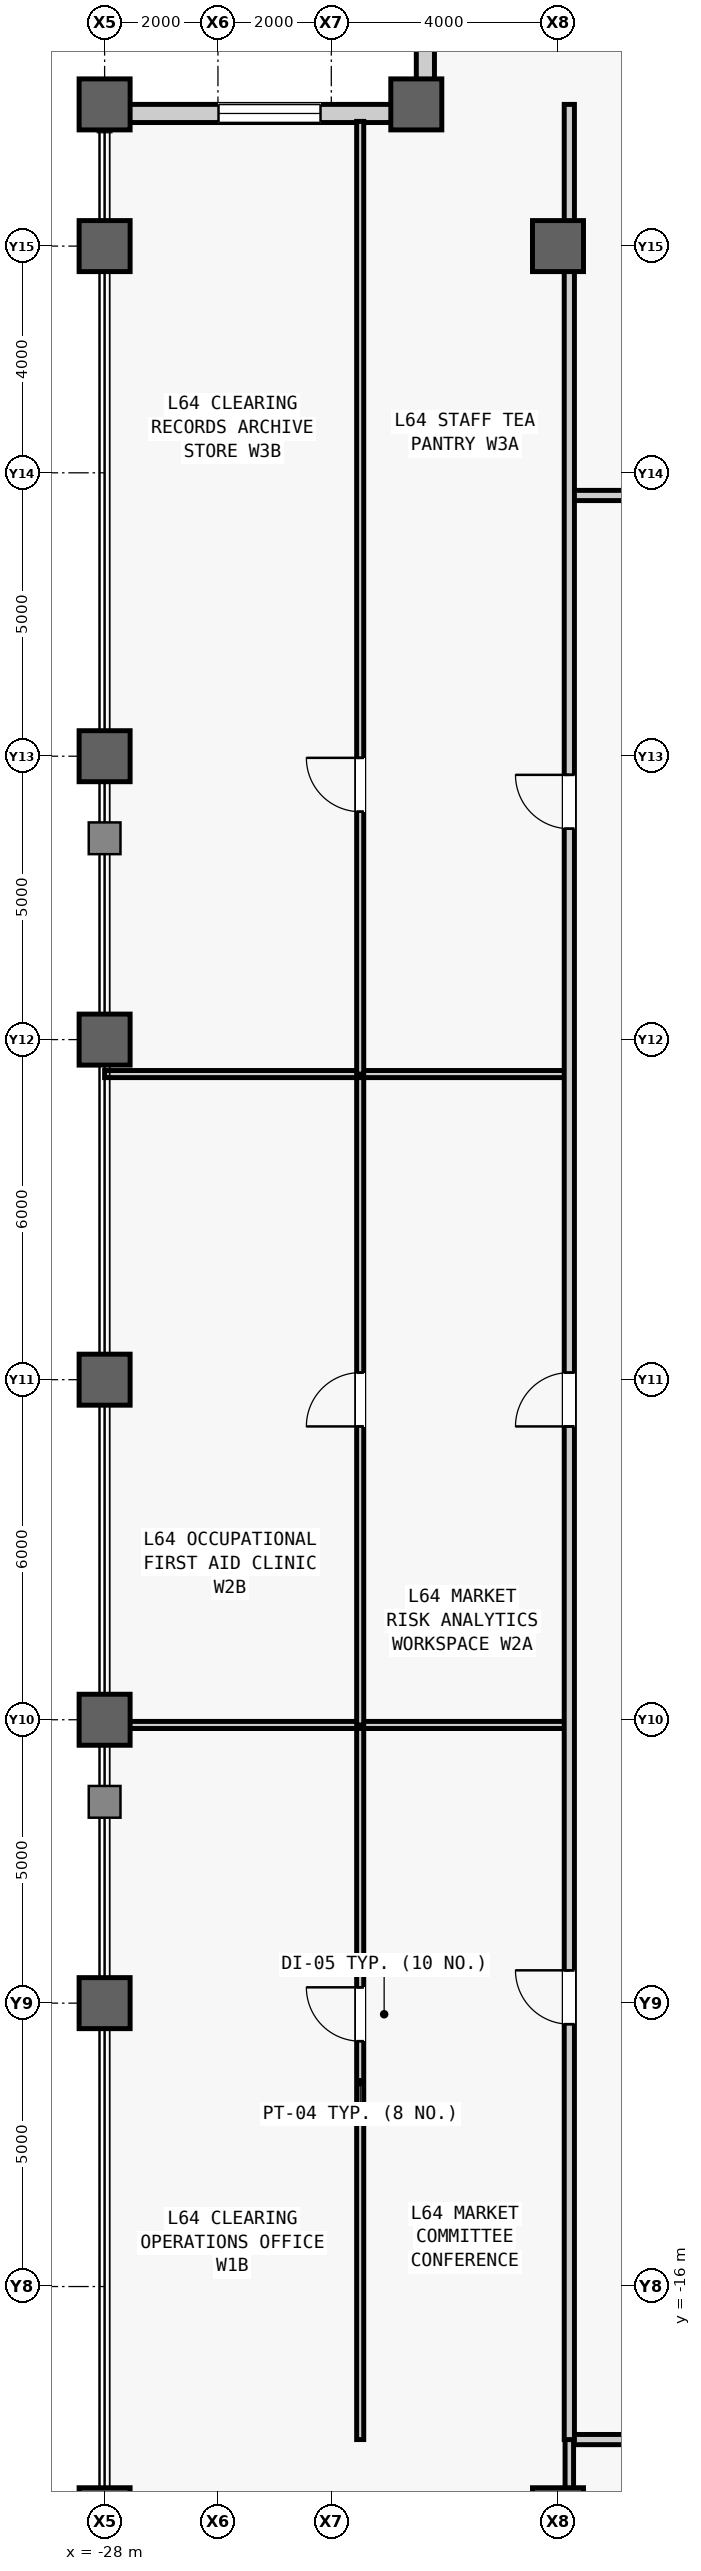
"""IFC4 building model, lengths in metres.
Left out: names, types, materials, properties, quantities, classifications, styles, units other than length and angle.
Written with IfcOpenShell. Run it as: python <this file> out.ifc"""

import sys

from ifc_helpers import new_model, si_unit, direction, frame, frame_2d, origin, origin_2d, place, context, subcontext, project, spatial, rectangle, hollow_rectangle, extrude, source, transform, mapped, element, fill, save


model = new_model("IFC4")
c1 = context("Model", 3, precision=1e-05, world=origin(), true_north=direction((0.0, 1.0)))
c2 = subcontext(c1, "Body", "Model", "MODEL_VIEW")
j1 = project(units=[si_unit("LENGTHUNIT", "METRE"), si_unit("PLANEANGLEUNIT", "RADIAN")], contexts=[c1])
p1 = place(None, origin())
s1 = spatial("IfcSite", under=j1, at=p1, CompositionType="ELEMENT")
p2 = place(p1, origin())
s2 = spatial("IfcBuilding", under=s1, at=p2, CompositionType="ELEMENT")
p3 = place(p2, frame((0.0, 0.0, 273.5)))
s3 = spatial("IfcBuildingStorey", under=s2, at=p3, CompositionType="ELEMENT", Elevation=273.5)
m1 = source(origin(), c2, "Body", "SweptSolid", [
    extrude(hollow_rectangle(XDim=0.9, YDim=0.9, WallThickness=0.05, at=origin_2d()), origin(), (0.0, 0.0, 1.0), 4.0),
])
for number, where, z_axis, x_axis in (
    (1, (-28.0, -20.0, 0.0), (0.0, 0.0, 1.0), (1.0, 0.0, 0.0)),
    (2, (-28.0, -11.0, 0.0), (0.0, 0.0, 1.0), (1.0, 0.0, 0.0)),
    (3, (-28.0, -6.0, 0.0), (0.0, 0.0, 1.0), (1.0, 0.0, 0.0)),
    (4, (-28.0, 0.0, 0.0), (0.0, 0.0, 1.0), (1.0, 0.0, 0.0)),
    (5, (-28.0, 6.0, 0.0), (0.0, 0.0, 1.0), (1.0, 0.0, 0.0)),
    (6, (-28.0, 11.0, 0.0), (0.0, 0.0, 1.0), (1.0, 0.0, 0.0)),
    (7, (-28.0, 20.0, 0.0), (0.0, 0.0, 1.0), (1.0, 0.0, 0.0)),
    (8, (-28.0, 22.5, 0.0), (0.0, 0.0, 1.0), (1.0, 0.0, 0.0)),
    (9, (-22.5, 22.5, 0.0), (0.0, 0.0, 1.0), (1.0, 0.0, 0.0)),
    (10, (-20.0, -20.0, 0.0), (0.0, 0.0, 1.0), (1.0, 0.0, 0.0)),
    (11, (-20.0, 20.0, 0.0), (0.0, 0.0, 1.0), (1.0, 0.0, 0.0)),
):
    element("IfcColumn", number, at=place(p3, frame(where, z_axis=z_axis, x_axis=x_axis)), inside=s3, PredefinedType="COLUMN", context=c2, shape_type="MappedRepresentation", body=[
        mapped(m1, transform((0.0, 0.0, 0.0), scale=1.0)),
    ])
m2 = source(origin(), c2, "Body", "SweptSolid", [
    extrude(rectangle(XDim=5.18, YDim=0.32, at=frame_2d((2.59, 0.0))), origin(), (0.0, 0.0, 1.0), 3.231),
])
p4 = place(p3, frame((-22.34, 22.5, 0.0), z_axis=(0.0, 0.0, 1.0), x_axis=(0.0, 1.0, 0.0)))
e12 = element("IfcWall", 12, at=p4, inside=s3, PredefinedType="STANDARD", context=c2, shape_type="MappedRepresentation", body=[
    mapped(m2, transform((0.0, 0.0, 0.0), scale=1.0)),
])
m3 = source(origin(), c2, "Body", "SweptSolid", [
    extrude(rectangle(XDim=1.8, YDim=2.4, at=frame_2d((0.9, 1.2))), frame((0.0, 0.17, 0.0), z_axis=(0.0, -1.0, 0.0), x_axis=(1.0, 0.0, 0.0)), (0.0, 0.0, 1.0), 0.34),
])
p5 = place(p4, frame((1.69, 0.0, 0.5)))
e13 = element("IfcOpeningElement", 13, at=p5, cuts=e12, PredefinedType="OPENING", context=c2, shape_type="MappedRepresentation", body=[
    mapped(m3, transform((0.0, 0.0, 0.0), scale=1.0)),
])
p6 = place(p3, frame((-22.5, 22.34, 0.0), z_axis=(0.0, 0.0, 1.0), x_axis=(-1.0, 0.0, 0.0)))
e14 = element("IfcWall", 14, at=p6, inside=s3, PredefinedType="STANDARD", context=c2, shape_type="MappedRepresentation", body=[
    mapped(m2, transform((0.0, 0.0, 0.0), scale=1.0)),
])
p7 = place(p6, frame((1.69, 0.0, 0.5)))
e15 = element("IfcOpeningElement", 15, at=p7, cuts=e14, PredefinedType="OPENING", context=c2, shape_type="MappedRepresentation", body=[
    mapped(m3, transform((0.0, 0.0, 0.0), scale=1.0)),
])
m4 = source(origin(), c2, "Body", "SweptSolid", [
    extrude(rectangle(XDim=2.4, YDim=0.18, at=frame_2d((1.2, 0.0))), origin(), (0.0, 0.0, 1.0), 3.78),
])
p8 = place(p3, frame((-19.8, 15.6, 0.0), z_axis=(0.0, 0.0, 1.0), x_axis=(1.0, 0.0, 0.0)))
e16 = element("IfcWall", 16, at=p8, inside=s3, PredefinedType="PARTITIONING", context=c2, shape_type="MappedRepresentation", body=[
    mapped(m4, transform((0.0, 0.0, 0.0), scale=1.0)),
])
m5 = source(origin(), c2, "Body", "SweptSolid", [
    extrude(rectangle(XDim=37.55, YDim=0.18, at=frame_2d((18.775, 0.0))), origin(), (0.0, 0.0, 1.0), 3.78),
])
p9 = place(p3, frame((-19.8, -18.7, 0.0), z_axis=(0.0, 0.0, 1.0), x_axis=(1.0, 0.0, 0.0)))
e17 = element("IfcWall", 17, at=p9, inside=s3, PredefinedType="PARTITIONING", context=c2, shape_type="MappedRepresentation", body=[
    mapped(m5, transform((0.0, 0.0, 0.0), scale=1.0)),
])
m6 = source(origin(), c2, "Body", "SweptSolid", [
    extrude(rectangle(XDim=1.05, YDim=2.2, at=frame_2d((0.525, 1.1))), frame((0.0, 0.1, 0.0), z_axis=(0.0, -1.0, 0.0), x_axis=(1.0, 0.0, 0.0)), (0.0, 0.0, 1.0), 0.2),
])
p10 = place(p9, frame((7.11, 0.0, 0.0)))
e18 = element("IfcOpeningElement", 18, at=p10, cuts=e17, PredefinedType="OPENING", context=c2, shape_type="MappedRepresentation", body=[
    mapped(m6, transform((0.0, 0.0, 0.0), scale=1.0)),
])
p11 = place(p9, frame((24.86, 0.0, 0.0)))
e19 = element("IfcOpeningElement", 19, at=p11, cuts=e17, PredefinedType="OPENING", context=c2, shape_type="MappedRepresentation", body=[
    mapped(m6, transform((0.0, 0.0, 0.0), scale=1.0)),
])
m7 = source(origin(), c2, "Body", "SweptSolid", [
    extrude(rectangle(XDim=9.3, YDim=0.15, at=frame_2d((4.65, 0.0))), origin(), (0.0, 0.0, 1.0), 3.164),
])
p12 = place(p3, frame((-19.8, -28.0, 0.0), z_axis=(0.0, 0.0, 1.0), x_axis=(0.0, 1.0, 0.0)))
e20 = element("IfcWall", 20, at=p12, inside=s3, PredefinedType="PARTITIONING", context=c2, shape_type="MappedRepresentation", body=[
    mapped(m7, transform((0.0, 0.0, 0.0), scale=1.0)),
])
m8 = source(origin(), c2, "Body", "SweptSolid", [
    extrude(rectangle(XDim=12.608, YDim=0.125, at=frame_2d((6.304, 0.0))), origin(), (0.0, 0.0, 1.0), 3.78),
])
p13 = place(p3, frame((-23.49, -18.7, 0.0), z_axis=(0.0, 0.0, 1.0), x_axis=(0.0, 1.0, 0.0)))
e21 = element("IfcWall", 21, at=p13, inside=s3, PredefinedType="PARTITIONING", context=c2, shape_type="MappedRepresentation", body=[
    mapped(m8, transform((0.0, 0.0, 0.0), scale=1.0)),
])
m9 = source(origin(), c2, "Body", "SweptSolid", [
    extrude(rectangle(XDim=0.95, YDim=2.15, at=frame_2d((0.475, 1.075))), frame((0.0, 0.073, 0.0), z_axis=(0.0, -1.0, 0.0), x_axis=(1.0, 0.0, 0.0)), (0.0, 0.0, 1.0), 0.145),
])
p14 = place(p13, frame((7.029, 0.0, 0.0)))
e22 = element("IfcOpeningElement", 22, at=p14, cuts=e21, PredefinedType="OPENING", context=c2, shape_type="MappedRepresentation", body=[
    mapped(m9, transform((0.0, 0.0, 0.0), scale=1.0)),
])
m10 = source(origin(), c2, "Body", "SweptSolid", [
    extrude(rectangle(XDim=8.2, YDim=0.125, at=frame_2d((4.1, 0.0))), origin(), (0.0, 0.0, 1.0), 3.085),
])
p15 = place(p3, frame((-28.0, -6.092, 0.0), z_axis=(0.0, 0.0, 1.0), x_axis=(1.0, 0.0, 0.0)))
e23 = element("IfcWall", 23, at=p15, inside=s3, PredefinedType="PARTITIONING", context=c2, shape_type="MappedRepresentation", body=[
    mapped(m10, transform((0.0, 0.0, 0.0), scale=1.0)),
])
m11 = source(origin(), c2, "Body", "SweptSolid", [
    extrude(rectangle(XDim=11.484, YDim=0.125, at=frame_2d((5.742, 0.0))), origin(), (0.0, 0.0, 1.0), 3.78),
])
p16 = place(p3, frame((-23.49, -6.092, 0.0), z_axis=(0.0, 0.0, 1.0), x_axis=(0.0, 1.0, 0.0)))
e24 = element("IfcWall", 24, at=p16, inside=s3, PredefinedType="PARTITIONING", context=c2, shape_type="MappedRepresentation", body=[
    mapped(m11, transform((0.0, 0.0, 0.0), scale=1.0)),
])
p17 = place(p16, frame((5.267, 0.0, 0.0)))
e25 = element("IfcOpeningElement", 25, at=p17, cuts=e24, PredefinedType="OPENING", context=c2, shape_type="MappedRepresentation", body=[
    mapped(m9, transform((0.0, 0.0, 0.0), scale=1.0)),
])
m12 = source(origin(), c2, "Body", "SweptSolid", [
    extrude(rectangle(XDim=8.2, YDim=0.125, at=frame_2d((4.1, 0.0))), origin(), (0.0, 0.0, 1.0), 3.78),
])
p18 = place(p3, frame((-28.0, 5.392, 0.0), z_axis=(0.0, 0.0, 1.0), x_axis=(1.0, 0.0, 0.0)))
e26 = element("IfcWall", 26, at=p18, inside=s3, PredefinedType="PARTITIONING", context=c2, shape_type="MappedRepresentation", body=[
    mapped(m12, transform((0.0, 0.0, 0.0), scale=1.0)),
])
m13 = source(origin(), c2, "Body", "SweptSolid", [
    extrude(rectangle(XDim=16.808, YDim=0.125, at=frame_2d((8.404, 0.0))), origin(), (0.0, 0.0, 1.0), 3.78),
])
p19 = place(p3, frame((-23.49, 5.392, 0.0), z_axis=(0.0, 0.0, 1.0), x_axis=(0.0, 1.0, 0.0)))
e27 = element("IfcWall", 27, at=p19, inside=s3, PredefinedType="PARTITIONING", context=c2, shape_type="MappedRepresentation", body=[
    mapped(m13, transform((0.0, 0.0, 0.0), scale=1.0)),
])
p20 = place(p19, frame((4.629, 0.0, 0.0)))
e28 = element("IfcOpeningElement", 28, at=p20, cuts=e27, PredefinedType="OPENING", context=c2, shape_type="MappedRepresentation", body=[
    mapped(m9, transform((0.0, 0.0, 0.0), scale=1.0)),
])
m14 = source(origin(), c2, "Body", "SweptSolid", [
    extrude(rectangle(XDim=41.2, YDim=0.18, at=frame_2d((20.6, 0.0))), origin(), (0.0, 0.0, 1.0), 3.164),
])
p21 = place(p3, frame((-19.8, -18.7, 0.0), z_axis=(0.0, 0.0, 1.0), x_axis=(0.0, 1.0, 0.0)))
e29 = element("IfcWall", 29, at=p21, inside=s3, PredefinedType="PARTITIONING", context=c2, shape_type="MappedRepresentation", body=[
    mapped(m14, transform((0.0, 0.0, 0.0), scale=1.0)),
])
m15 = source(origin(), c2, "Body", "SweptSolid", [
    extrude(rectangle(XDim=0.95, YDim=2.15, at=frame_2d((0.475, 1.075))), frame((0.0, 0.1, 0.0), z_axis=(0.0, -1.0, 0.0), x_axis=(1.0, 0.0, 0.0)), (0.0, 0.0, 1.0), 0.2),
])
p22 = place(p21, frame((7.329, 0.0, 0.0)))
e30 = element("IfcOpeningElement", 30, at=p22, cuts=e29, PredefinedType="OPENING", context=c2, shape_type="MappedRepresentation", body=[
    mapped(m15, transform((0.0, 0.0, 0.0), scale=1.0)),
])
p23 = place(p21, frame((17.875, 0.0, 0.0)))
e31 = element("IfcOpeningElement", 31, at=p23, cuts=e29, PredefinedType="OPENING", context=c2, shape_type="MappedRepresentation", body=[
    mapped(m15, transform((0.0, 0.0, 0.0), scale=1.0)),
])
p24 = place(p21, frame((28.421, 0.0, 0.0)))
e32 = element("IfcOpeningElement", 32, at=p24, cuts=e29, PredefinedType="OPENING", context=c2, shape_type="MappedRepresentation", body=[
    mapped(m15, transform((0.0, 0.0, 0.0), scale=1.0)),
])
m16 = source(origin(), c2, "Body", "SweptSolid", [
    extrude(rectangle(XDim=1.8, YDim=2.4, at=frame_2d((0.9, 1.2))), frame((0.0, 0.03, 0.0), z_axis=(0.0, -1.0, 0.0), x_axis=(1.0, 0.0, 0.0)), (0.0, 0.0, 1.0), 0.06),
])
p25 = place(p7, origin())
e33 = element("IfcWindow", 33, at=p25, inside=s3, PartitioningType="SINGLE_PANEL", PredefinedType="WINDOW", context=c2, shape_type="MappedRepresentation", body=[
    mapped(m16, transform((0.0, 0.0, 0.0), scale=1.0)),
])
fill(e15, e33)
m17 = source(origin(), c2, "Body", "SweptSolid", [
    extrude(rectangle(XDim=0.95, YDim=2.15, at=frame_2d((0.475, 1.075))), frame((0.0, 0.025, 0.0), z_axis=(0.0, -1.0, 0.0), x_axis=(1.0, 0.0, 0.0)), (0.0, 0.0, 1.0), 0.05),
])
p26 = place(p14, origin())
e34 = element("IfcDoor", 34, at=p26, inside=s3, OperationType="SINGLE_SWING_RIGHT", PredefinedType="DOOR", context=c2, shape_type="MappedRepresentation", body=[
    mapped(m17, transform((0.0, 0.0, 0.0), scale=1.0)),
])
fill(e22, e34)
p27 = place(p17, origin())
e35 = element("IfcDoor", 35, at=p27, inside=s3, OperationType="SINGLE_SWING_LEFT", PredefinedType="DOOR", context=c2, shape_type="MappedRepresentation", body=[
    mapped(m17, transform((0.0, 0.0, 0.0), scale=1.0)),
])
fill(e25, e35)
p28 = place(p20, origin())
e36 = element("IfcDoor", 36, at=p28, inside=s3, OperationType="SINGLE_SWING_RIGHT", PredefinedType="DOOR", context=c2, shape_type="MappedRepresentation", body=[
    mapped(m17, transform((0.0, 0.0, 0.0), scale=1.0)),
])
fill(e28, e36)
p29 = place(p22, origin())
e37 = element("IfcDoor", 37, at=p29, inside=s3, OperationType="SINGLE_SWING_RIGHT", PredefinedType="DOOR", context=c2, shape_type="MappedRepresentation", body=[
    mapped(m17, transform((0.0, 0.0, 0.0), scale=1.0)),
])
fill(e30, e37)
p30 = place(p23, origin())
e38 = element("IfcDoor", 38, at=p30, inside=s3, OperationType="SINGLE_SWING_LEFT", PredefinedType="DOOR", context=c2, shape_type="MappedRepresentation", body=[
    mapped(m17, transform((0.0, 0.0, 0.0), scale=1.0)),
])
fill(e31, e38)
p31 = place(p24, origin())
e39 = element("IfcDoor", 39, at=p31, inside=s3, OperationType="SINGLE_SWING_RIGHT", PredefinedType="DOOR", context=c2, shape_type="MappedRepresentation", body=[
    mapped(m17, transform((0.0, 0.0, 0.0), scale=1.0)),
])
fill(e32, e39)
save(model, sys.argv[1])
